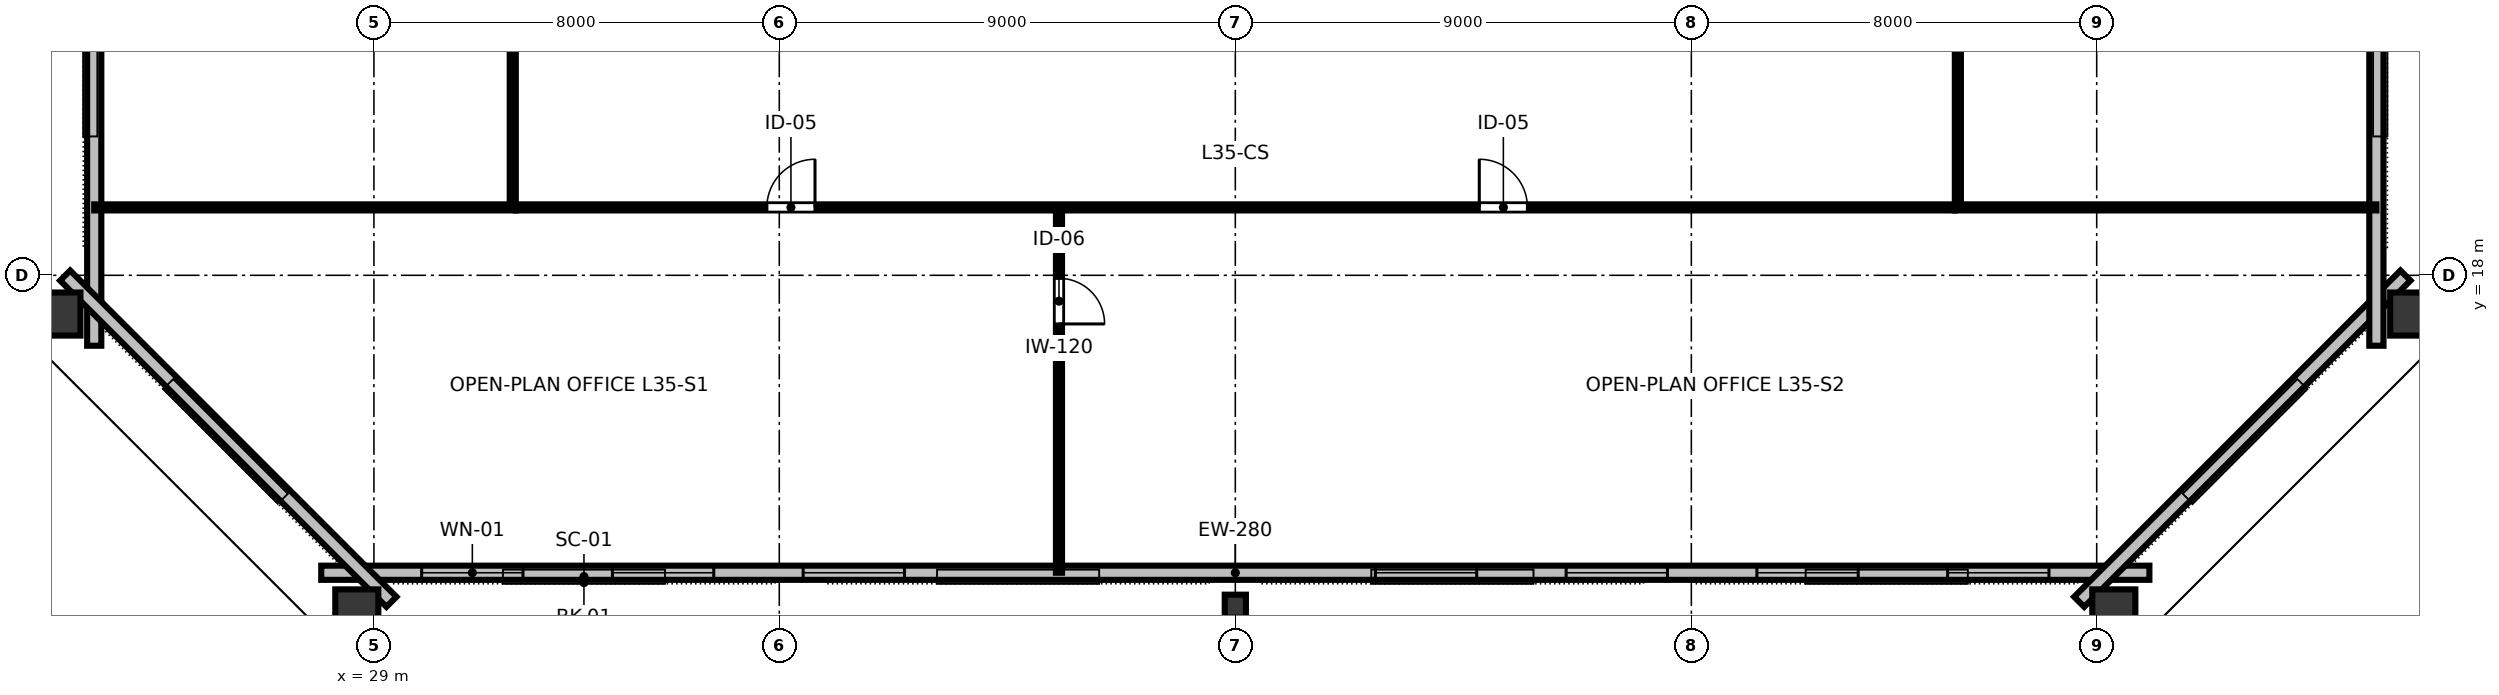
"""IFC4 building model, lengths in metres.
Left out: names, types, materials, properties, quantities, classifications, styles, units other than length and angle.
Written with IfcOpenShell. Run it as: python <this file> out.ifc"""

import sys

from ifc_helpers import new_model, si_unit, direction, frame, frame_2d, origin, origin_2d, place, context, subcontext, project, spatial, rectangle, hollow_rectangle, i_section, extrude, element, fill, save


model = new_model("IFC4")
c1 = context("Model", 3, precision=1e-05, world=origin(), true_north=direction((0.0, 1.0)))
c2 = subcontext(c1, "Body", "Model", "MODEL_VIEW")
j1 = project(units=[si_unit("LENGTHUNIT", "METRE"), si_unit("PLANEANGLEUNIT", "RADIAN")], contexts=[c1])
p1 = place(None, origin())
s1 = spatial("IfcSite", under=j1, at=p1, CompositionType="ELEMENT")
p2 = place(p1, origin())
s2 = spatial("IfcBuilding", under=s1, at=p2, CompositionType="ELEMENT")
p3 = place(p2, frame((0.0, 0.0, 134.8)))
s3 = spatial("IfcBuildingStorey", under=s2, at=p3, CompositionType="ELEMENT", Elevation=134.8)
p4 = place(p3, frame((28.662, 11.302, 0.0), z_axis=(-0.059349667623, -0.074114706886, 0.995482107914), x_axis=(0.780571247111, -0.625066818975, 0.0)))
e1 = element("IfcColumn", 1, at=p4, inside=s3, PredefinedType="COLUMN", context=c2, shape_type="SweptSolid", body=[
    extrude(hollow_rectangle(XDim=0.85, YDim=1.0, WallThickness=0.05, at=origin_2d()), origin(), (0.0, 0.0, 1.0), 3.373),
])
p5 = place(p3, frame((46.0, 11.47, 0.0), z_axis=(0.0, -0.074245582927, 0.997239987874), x_axis=(1.0, 0.0, 0.0)))
e2 = element("IfcColumn", 2, at=p5, inside=s3, PredefinedType="COLUMN", context=c2, shape_type="SweptSolid", body=[
    extrude(i_section(OverallWidth=0.418, OverallDepth=0.455, WebThickness=0.042, FlangeThickness=0.068, FilletRadius=0.025, at=origin_2d()), origin(), (0.0, 0.0, 1.0), 3.367),
])
p6 = place(p3, frame((63.338, 11.302, 0.0), z_axis=(0.059349667623, -0.074114706886, 0.995482107914), x_axis=(0.780571247111, 0.625066818975, 0.0)))
e3 = element("IfcColumn", 3, at=p6, inside=s3, PredefinedType="COLUMN", context=c2, shape_type="SweptSolid", body=[
    extrude(hollow_rectangle(XDim=0.85, YDim=1.0, WallThickness=0.05, at=origin_2d()), origin(), (0.0, 0.0, 1.0), 3.373),
])
for number, where, z_axis, x_axis in (
    (4, (69.292, 17.236, 0.0), (0.089, -0.045, 0.995), (-0.889, 0.448, 0.099)),
    (5, (22.708, 17.236, 0.0), (-0.089, -0.045, 0.995), (0.889, 0.448, 0.099)),
):
    element("IfcColumn", number, at=place(p3, frame(where, z_axis=z_axis, x_axis=x_axis)), inside=s3, PredefinedType="COLUMN", context=c2, shape_type="SweptSolid", body=[
        extrude(hollow_rectangle(XDim=0.85, YDim=1.0, WallThickness=0.05, at=origin_2d()), origin(), (0.0, 0.0, 1.0), 3.375),
    ])
p7 = place(p3, frame((27.96, 12.13, 0.0), z_axis=(0.0, 0.0, 1.0), x_axis=(1.0, 0.0, 0.0)))
e6 = element("IfcWall", 6, at=p7, inside=s3, PredefinedType="STANDARD", context=c2, shape_type="SweptSolid", body=[
    extrude(rectangle(XDim=36.08, YDim=0.28, at=frame_2d((18.04, 0.0))), origin(), (0.0, 0.0, 1.0), 3.36),
])
p8 = place(p7, frame((1.982, 0.0, 0.8)))
e7 = element("IfcOpeningElement", 7, at=p8, cuts=e6, PredefinedType="OPENING", context=c2, shape_type="SweptSolid", body=[
    extrude(rectangle(XDim=2.0, YDim=1.95, at=frame_2d((1.0, 0.975))), frame((0.0, 0.15, 0.0), z_axis=(0.0, -1.0, 0.0), x_axis=(1.0, 0.0, 0.0)), (0.0, 0.0, 1.0), 0.3),
])
p9 = place(p7, frame((5.747, 0.0, 0.8)))
e8 = element("IfcOpeningElement", 8, at=p9, cuts=e6, PredefinedType="OPENING", context=c2, shape_type="SweptSolid", body=[
    extrude(rectangle(XDim=2.0, YDim=1.95, at=frame_2d((1.0, 0.975))), frame((0.0, 0.15, 0.0), z_axis=(0.0, -1.0, 0.0), x_axis=(1.0, 0.0, 0.0)), (0.0, 0.0, 1.0), 0.3),
])
p10 = place(p7, frame((9.511, 0.0, 0.8)))
e9 = element("IfcOpeningElement", 9, at=p10, cuts=e6, PredefinedType="OPENING", context=c2, shape_type="SweptSolid", body=[
    extrude(rectangle(XDim=2.0, YDim=1.95, at=frame_2d((1.0, 0.975))), frame((0.0, 0.15, 0.0), z_axis=(0.0, -1.0, 0.0), x_axis=(1.0, 0.0, 0.0)), (0.0, 0.0, 1.0), 0.3),
])
p11 = place(p7, frame((20.804, 0.0, 0.8)))
e10 = element("IfcOpeningElement", 10, at=p11, cuts=e6, PredefinedType="OPENING", context=c2, shape_type="SweptSolid", body=[
    extrude(rectangle(XDim=2.0, YDim=1.95, at=frame_2d((1.0, 0.975))), frame((0.0, 0.15, 0.0), z_axis=(0.0, -1.0, 0.0), x_axis=(1.0, 0.0, 0.0)), (0.0, 0.0, 1.0), 0.3),
])
p12 = place(p7, frame((24.569, 0.0, 0.8)))
e11 = element("IfcOpeningElement", 11, at=p12, cuts=e6, PredefinedType="OPENING", context=c2, shape_type="SweptSolid", body=[
    extrude(rectangle(XDim=2.0, YDim=1.95, at=frame_2d((1.0, 0.975))), frame((0.0, 0.15, 0.0), z_axis=(0.0, -1.0, 0.0), x_axis=(1.0, 0.0, 0.0)), (0.0, 0.0, 1.0), 0.3),
])
p13 = place(p7, frame((28.333, 0.0, 0.8)))
e12 = element("IfcOpeningElement", 12, at=p13, cuts=e6, PredefinedType="OPENING", context=c2, shape_type="SweptSolid", body=[
    extrude(rectangle(XDim=2.0, YDim=1.95, at=frame_2d((1.0, 0.975))), frame((0.0, 0.15, 0.0), z_axis=(0.0, -1.0, 0.0), x_axis=(1.0, 0.0, 0.0)), (0.0, 0.0, 1.0), 0.3),
])
p14 = place(p7, frame((32.098, 0.0, 0.8)))
e13 = element("IfcOpeningElement", 13, at=p14, cuts=e6, PredefinedType="OPENING", context=c2, shape_type="SweptSolid", body=[
    extrude(rectangle(XDim=2.0, YDim=1.95, at=frame_2d((1.0, 0.975))), frame((0.0, 0.15, 0.0), z_axis=(0.0, -1.0, 0.0), x_axis=(1.0, 0.0, 0.0)), (0.0, 0.0, 1.0), 0.3),
])
p15 = place(p3, frame((62.655, 11.556, 0.0), z_axis=(0.0, 0.0, 1.0), x_axis=(0.707106781187, 0.707106781187, 0.0)))
e14 = element("IfcWall", 14, at=p15, inside=s3, PredefinedType="STANDARD", context=c2, shape_type="SweptSolid", body=[
    extrude(rectangle(XDim=9.107, YDim=0.28, at=frame_2d((4.553, 0.0))), origin(), (0.0, 0.0, 1.0), 3.36),
])
p16 = place(p3, frame((68.52, 16.61, 0.0), z_axis=(0.0, 0.0, 1.0), x_axis=(0.0, 1.0, 0.0)))
e15 = element("IfcWall", 15, at=p16, inside=s3, PredefinedType="STANDARD", context=c2, shape_type="SweptSolid", body=[
    extrude(rectangle(XDim=30.78, YDim=0.28, at=frame_2d((15.39, 0.0))), origin(), (0.0, 0.0, 1.0), 3.36),
])
p17 = place(p16, frame((6.224, 0.0, 0.8)))
e16 = element("IfcOpeningElement", 16, at=p17, cuts=e15, PredefinedType="OPENING", context=c2, shape_type="SweptSolid", body=[
    extrude(rectangle(XDim=2.0, YDim=1.95, at=frame_2d((1.0, 0.975))), frame((0.0, 0.15, 0.0), z_axis=(0.0, -1.0, 0.0), x_axis=(1.0, 0.0, 0.0)), (0.0, 0.0, 1.0), 0.3),
])
p18 = place(p16, frame((18.473, 0.0, 0.8)))
e17 = element("IfcOpeningElement", 17, at=p18, cuts=e15, PredefinedType="OPENING", context=c2, shape_type="SweptSolid", body=[
    extrude(rectangle(XDim=2.0, YDim=1.95, at=frame_2d((1.0, 0.975))), frame((0.0, 0.15, 0.0), z_axis=(0.0, -1.0, 0.0), x_axis=(1.0, 0.0, 0.0)), (0.0, 0.0, 1.0), 0.3),
])
p19 = place(p16, frame((22.556, 0.0, 0.8)))
e18 = element("IfcOpeningElement", 18, at=p19, cuts=e15, PredefinedType="OPENING", context=c2, shape_type="SweptSolid", body=[
    extrude(rectangle(XDim=2.0, YDim=1.95, at=frame_2d((1.0, 0.975))), frame((0.0, 0.15, 0.0), z_axis=(0.0, -1.0, 0.0), x_axis=(1.0, 0.0, 0.0)), (0.0, 0.0, 1.0), 0.3),
])
p20 = place(p3, frame((23.48, 47.39, 0.0), z_axis=(0.0, 0.0, 1.0), x_axis=(0.0, -1.0, 0.0)))
e19 = element("IfcWall", 19, at=p20, inside=s3, PredefinedType="STANDARD", context=c2, shape_type="SweptSolid", body=[
    extrude(rectangle(XDim=30.78, YDim=0.28, at=frame_2d((15.39, 0.0))), origin(), (0.0, 0.0, 1.0), 3.36),
])
p21 = place(p20, frame((6.224, 0.0, 0.8)))
e20 = element("IfcOpeningElement", 20, at=p21, cuts=e19, PredefinedType="OPENING", context=c2, shape_type="SweptSolid", body=[
    extrude(rectangle(XDim=2.0, YDim=1.95, at=frame_2d((1.0, 0.975))), frame((0.0, 0.15, 0.0), z_axis=(0.0, -1.0, 0.0), x_axis=(1.0, 0.0, 0.0)), (0.0, 0.0, 1.0), 0.3),
])
p22 = place(p20, frame((10.307, 0.0, 0.8)))
e21 = element("IfcOpeningElement", 21, at=p22, cuts=e19, PredefinedType="OPENING", context=c2, shape_type="SweptSolid", body=[
    extrude(rectangle(XDim=2.0, YDim=1.95, at=frame_2d((1.0, 0.975))), frame((0.0, 0.15, 0.0), z_axis=(0.0, -1.0, 0.0), x_axis=(1.0, 0.0, 0.0)), (0.0, 0.0, 1.0), 0.3),
])
p23 = place(p20, frame((18.473, 0.0, 0.8)))
e22 = element("IfcOpeningElement", 22, at=p23, cuts=e19, PredefinedType="OPENING", context=c2, shape_type="SweptSolid", body=[
    extrude(rectangle(XDim=2.0, YDim=1.95, at=frame_2d((1.0, 0.975))), frame((0.0, 0.15, 0.0), z_axis=(0.0, -1.0, 0.0), x_axis=(1.0, 0.0, 0.0)), (0.0, 0.0, 1.0), 0.3),
])
p24 = place(p20, frame((22.556, 0.0, 0.8)))
e23 = element("IfcOpeningElement", 23, at=p24, cuts=e19, PredefinedType="OPENING", context=c2, shape_type="SweptSolid", body=[
    extrude(rectangle(XDim=2.0, YDim=1.95, at=frame_2d((1.0, 0.975))), frame((0.0, 0.15, 0.0), z_axis=(0.0, -1.0, 0.0), x_axis=(1.0, 0.0, 0.0)), (0.0, 0.0, 1.0), 0.3),
])
p25 = place(p3, frame((22.906, 17.996, 0.0), z_axis=(0.0, 0.0, 1.0), x_axis=(0.707106781187, -0.707106781187, 0.0)))
e24 = element("IfcWall", 24, at=p25, inside=s3, PredefinedType="STANDARD", context=c2, shape_type="SweptSolid", body=[
    extrude(rectangle(XDim=9.107, YDim=0.28, at=frame_2d((4.553, 0.0))), origin(), (0.0, 0.0, 1.0), 3.36),
])
p26 = place(p3, frame((42.52, 19.34, 0.0), z_axis=(0.0, 0.0, 1.0), x_axis=(0.0, -1.0, 0.0)))
e25 = element("IfcWall", 25, at=p26, inside=s3, PredefinedType="PARTITIONING", context=c2, shape_type="SweptSolid", body=[
    extrude(rectangle(XDim=7.21, YDim=0.12, at=frame_2d((3.605, 0.0))), origin(), (0.0, 0.0, 1.0), 2.64),
])
p27 = place(p26, frame((1.4, 0.0, 0.0)))
e26 = element("IfcOpeningElement", 26, at=p27, cuts=e25, PredefinedType="OPENING", context=c2, shape_type="SweptSolid", body=[
    extrude(rectangle(XDim=0.9, YDim=2.15, at=frame_2d((0.45, 1.075))), frame((0.0, 0.07, 0.0), z_axis=(0.0, -1.0, 0.0), x_axis=(1.0, 0.0, 0.0)), (0.0, 0.0, 1.0), 0.14),
])
p28 = place(p3, frame((31.8, 19.34, 0.0), z_axis=(0.0, 0.0, 1.0), x_axis=(1.0, 0.0, 0.0)))
e27 = element("IfcWall", 27, at=p28, inside=s3, PredefinedType="PARTITIONING", context=c2, shape_type="SweptSolid", body=[
    extrude(rectangle(XDim=28.4, YDim=0.12, at=frame_2d((14.2, 0.0))), origin(), (0.0, 0.0, 1.0), 2.64),
])
p29 = place(p28, frame((4.955, 0.0, 0.0)))
e28 = element("IfcOpeningElement", 28, at=p29, cuts=e27, PredefinedType="OPENING", context=c2, shape_type="SweptSolid", body=[
    extrude(rectangle(XDim=0.95, YDim=2.15, at=frame_2d((0.475, 1.075))), frame((0.0, 0.07, 0.0), z_axis=(0.0, -1.0, 0.0), x_axis=(1.0, 0.0, 0.0)), (0.0, 0.0, 1.0), 0.14),
])
p30 = place(p28, frame((19.015, 0.0, 0.0)))
e29 = element("IfcOpeningElement", 29, at=p30, cuts=e27, PredefinedType="OPENING", context=c2, shape_type="SweptSolid", body=[
    extrude(rectangle(XDim=0.95, YDim=2.15, at=frame_2d((0.475, 1.075))), frame((0.0, 0.07, 0.0), z_axis=(0.0, -1.0, 0.0), x_axis=(1.0, 0.0, 0.0)), (0.0, 0.0, 1.0), 0.14),
])
p31 = place(p3, frame((31.74, 19.4, 0.0), z_axis=(0.0, 0.0, 1.0), x_axis=(0.0, 1.0, 0.0)))
e30 = element("IfcWall", 30, at=p31, inside=s3, PredefinedType="PARTITIONING", context=c2, shape_type="SweptSolid", body=[
    extrude(rectangle(XDim=11.58, YDim=0.12, at=frame_2d((5.79, 0.0))), origin(), (0.0, 0.0, 1.0), 2.64),
])
p32 = place(p31, frame((5.415, 0.0, 0.0)))
e31 = element("IfcOpeningElement", 31, at=p32, cuts=e30, PredefinedType="OPENING", context=c2, shape_type="SweptSolid", body=[
    extrude(rectangle(XDim=0.95, YDim=2.15, at=frame_2d((0.475, 1.075))), frame((0.0, 0.07, 0.0), z_axis=(0.0, -1.0, 0.0), x_axis=(1.0, 0.0, 0.0)), (0.0, 0.0, 1.0), 0.14),
])
p33 = place(p3, frame((60.26, 19.4, 0.0), z_axis=(0.0, 0.0, 1.0), x_axis=(0.0, 1.0, 0.0)))
e32 = element("IfcWall", 32, at=p33, inside=s3, PredefinedType="PARTITIONING", context=c2, shape_type="SweptSolid", body=[
    extrude(rectangle(XDim=11.58, YDim=0.12, at=frame_2d((5.79, 0.0))), origin(), (0.0, 0.0, 1.0), 2.64),
])
p34 = place(p33, frame((3.925, 0.0, 0.0)))
e33 = element("IfcOpeningElement", 33, at=p34, cuts=e32, PredefinedType="OPENING", context=c2, shape_type="SweptSolid", body=[
    extrude(rectangle(XDim=0.95, YDim=2.15, at=frame_2d((0.475, 1.075))), frame((0.0, 0.07, 0.0), z_axis=(0.0, -1.0, 0.0), x_axis=(1.0, 0.0, 0.0)), (0.0, 0.0, 1.0), 0.14),
])
p35 = place(p33, frame((9.615, 0.0, 0.0)))
e34 = element("IfcOpeningElement", 34, at=p35, cuts=e32, PredefinedType="OPENING", context=c2, shape_type="SweptSolid", body=[
    extrude(rectangle(XDim=0.95, YDim=2.15, at=frame_2d((0.475, 1.075))), frame((0.0, 0.07, 0.0), z_axis=(0.0, -1.0, 0.0), x_axis=(1.0, 0.0, 0.0)), (0.0, 0.0, 1.0), 0.14),
])
for number, where, z_axis, x_axis in (
    (35, (31.8, 19.34, 0.0), (0.0, 0.0, 1.0), (-1.0, 0.0, 0.0)),
    (36, (60.2, 19.34, 0.0), (0.0, 0.0, 1.0), (1.0, 0.0, 0.0)),
):
    element("IfcWall", number, at=place(p3, frame(where, z_axis=z_axis, x_axis=x_axis)), inside=s3, PredefinedType="PARTITIONING", context=c2, shape_type="SweptSolid", body=[
        extrude(rectangle(XDim=8.32, YDim=0.12, at=frame_2d((4.16, 0.0))), origin(), (0.0, 0.0, 1.0), 2.64),
    ])
p36 = place(p8, origin())
e37 = element("IfcWindow", 37, at=p36, inside=s3, PartitioningType="SINGLE_PANEL", PredefinedType="WINDOW", context=c2, shape_type="SweptSolid", body=[
    extrude(rectangle(XDim=2.0, YDim=1.95, at=frame_2d((1.0, 0.975))), frame((0.0, 0.03, 0.0), z_axis=(0.0, -1.0, 0.0), x_axis=(1.0, 0.0, 0.0)), (0.0, 0.0, 1.0), 0.06),
])
fill(e7, e37)
p37 = place(p9, origin())
e38 = element("IfcWindow", 38, at=p37, inside=s3, PartitioningType="SINGLE_PANEL", PredefinedType="WINDOW", context=c2, shape_type="SweptSolid", body=[
    extrude(rectangle(XDim=2.0, YDim=1.95, at=frame_2d((1.0, 0.975))), frame((0.0, 0.03, 0.0), z_axis=(0.0, -1.0, 0.0), x_axis=(1.0, 0.0, 0.0)), (0.0, 0.0, 1.0), 0.06),
])
fill(e8, e38)
p38 = place(p10, origin())
e39 = element("IfcWindow", 39, at=p38, inside=s3, PartitioningType="SINGLE_PANEL", PredefinedType="WINDOW", context=c2, shape_type="SweptSolid", body=[
    extrude(rectangle(XDim=2.0, YDim=1.95, at=frame_2d((1.0, 0.975))), frame((0.0, 0.03, 0.0), z_axis=(0.0, -1.0, 0.0), x_axis=(1.0, 0.0, 0.0)), (0.0, 0.0, 1.0), 0.06),
])
fill(e9, e39)
p39 = place(p11, origin())
e40 = element("IfcWindow", 40, at=p39, inside=s3, PartitioningType="SINGLE_PANEL", PredefinedType="WINDOW", context=c2, shape_type="SweptSolid", body=[
    extrude(rectangle(XDim=2.0, YDim=1.95, at=frame_2d((1.0, 0.975))), frame((0.0, 0.03, 0.0), z_axis=(0.0, -1.0, 0.0), x_axis=(1.0, 0.0, 0.0)), (0.0, 0.0, 1.0), 0.06),
])
fill(e10, e40)
p40 = place(p12, origin())
e41 = element("IfcWindow", 41, at=p40, inside=s3, PartitioningType="SINGLE_PANEL", PredefinedType="WINDOW", context=c2, shape_type="SweptSolid", body=[
    extrude(rectangle(XDim=2.0, YDim=1.95, at=frame_2d((1.0, 0.975))), frame((0.0, 0.03, 0.0), z_axis=(0.0, -1.0, 0.0), x_axis=(1.0, 0.0, 0.0)), (0.0, 0.0, 1.0), 0.06),
])
fill(e11, e41)
p41 = place(p13, origin())
e42 = element("IfcWindow", 42, at=p41, inside=s3, PartitioningType="SINGLE_PANEL", PredefinedType="WINDOW", context=c2, shape_type="SweptSolid", body=[
    extrude(rectangle(XDim=2.0, YDim=1.95, at=frame_2d((1.0, 0.975))), frame((0.0, 0.03, 0.0), z_axis=(0.0, -1.0, 0.0), x_axis=(1.0, 0.0, 0.0)), (0.0, 0.0, 1.0), 0.06),
])
fill(e12, e42)
p42 = place(p14, origin())
e43 = element("IfcWindow", 43, at=p42, inside=s3, PartitioningType="SINGLE_PANEL", PredefinedType="WINDOW", context=c2, shape_type="SweptSolid", body=[
    extrude(rectangle(XDim=2.0, YDim=1.95, at=frame_2d((1.0, 0.975))), frame((0.0, 0.03, 0.0), z_axis=(0.0, -1.0, 0.0), x_axis=(1.0, 0.0, 0.0)), (0.0, 0.0, 1.0), 0.06),
])
fill(e13, e43)
p43 = place(p27, origin())
e44 = element("IfcDoor", 44, at=p43, inside=s3, OperationType="SINGLE_SWING_RIGHT", PredefinedType="DOOR", context=c2, shape_type="SweptSolid", body=[
    extrude(rectangle(XDim=0.9, YDim=2.15, at=frame_2d((0.45, 1.075))), frame((0.0, 0.025, 0.0), z_axis=(0.0, -1.0, 0.0), x_axis=(1.0, 0.0, 0.0)), (0.0, 0.0, 1.0), 0.05),
])
fill(e26, e44)
p44 = place(p29, origin())
e45 = element("IfcDoor", 45, at=p44, inside=s3, OperationType="SINGLE_SWING_RIGHT", PredefinedType="DOOR", context=c2, shape_type="SweptSolid", body=[
    extrude(rectangle(XDim=0.95, YDim=2.15, at=frame_2d((0.475, 1.075))), frame((0.0, 0.025, 0.0), z_axis=(0.0, -1.0, 0.0), x_axis=(1.0, 0.0, 0.0)), (0.0, 0.0, 1.0), 0.05),
])
fill(e28, e45)
p45 = place(p30, origin())
e46 = element("IfcDoor", 46, at=p45, inside=s3, OperationType="SINGLE_SWING_LEFT", PredefinedType="DOOR", context=c2, shape_type="SweptSolid", body=[
    extrude(rectangle(XDim=0.95, YDim=2.15, at=frame_2d((0.475, 1.075))), frame((0.0, 0.025, 0.0), z_axis=(0.0, -1.0, 0.0), x_axis=(1.0, 0.0, 0.0)), (0.0, 0.0, 1.0), 0.05),
])
fill(e29, e46)
save(model, sys.argv[1])
